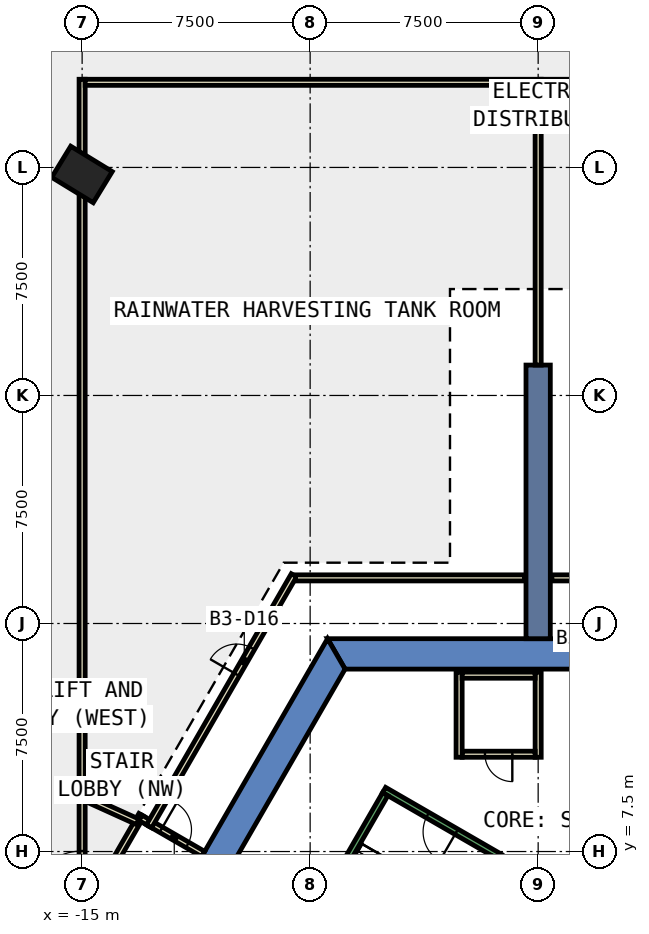
"""IFC4 building model, lengths in metres.
Left out: names, types, materials, properties, quantities, classifications, styles, units other than length and angle.
Written with IfcOpenShell. Run it as: python <this file> out.ifc"""

import sys

from ifc_helpers import new_model, si_unit, direction, frame, frame_2d, origin, origin_2d, place, context, subcontext, project, spatial, polyline, rectangle, outline, extrude, element, fill, save


model = new_model("IFC4")
c1 = context("Model", 3, precision=1e-05, world=origin(), true_north=direction((0.0, 1.0)))
c2 = subcontext(c1, "Body", "Model", "MODEL_VIEW")
j1 = project(units=[si_unit("LENGTHUNIT", "METRE"), si_unit("PLANEANGLEUNIT", "RADIAN")], contexts=[c1])
p1 = place(None, origin())
s1 = spatial("IfcSite", under=j1, at=p1, CompositionType="ELEMENT")
p2 = place(p1, origin())
s2 = spatial("IfcBuilding", under=s1, at=p2, CompositionType="ELEMENT")
p3 = place(p2, frame((0.0, 0.0, -16.5)))
s3 = spatial("IfcBuildingStorey", under=s2, at=p3, CompositionType="ELEMENT", Elevation=-16.5)
p4 = place(p3, frame((-15.005, 29.769, -0.4), z_axis=(0.0, 0.0, 1.0), x_axis=(0.521545830745, 0.853223268806, 0.0)))
e1 = element("IfcColumn", 1, at=p4, inside=s3, PredefinedType="COLUMN", context=c2, shape_type="SweptSolid", body=[
    extrude(rectangle(XDim=1.2, YDim=1.6, at=origin_2d()), origin(), (0.0, 0.0, 1.0), 5.48),
])
p5 = place(p3, origin())
e2 = element("IfcWall", 2, at=p5, inside=s3, PredefinedType="SHEAR", context=c2, shape_type="SweptSolid", body=[
    extrude(outline(polyline([(6.928, 14.5), (-6.928, 14.5), (-6.351, 13.5), (6.351, 13.5), (6.928, 14.5)])), origin(), (0.0, 0.0, 1.0), 5.08),
])
p6 = place(p3, origin())
e3 = element("IfcWall", 3, at=p6, inside=s3, PredefinedType="SHEAR", context=c2, shape_type="SweptSolid", body=[
    extrude(outline(polyline([(-12.267, 5.252), (-11.402, 4.752), (-6.351, 13.5), (-6.928, 14.5), (-12.267, 5.252)])), origin(), (0.0, 0.0, 1.0), 5.08),
])
p7 = place(p3, frame((0.0, 14.5, 0.0), z_axis=(0.0, 0.0, 1.0), x_axis=(0.0, 1.0, 0.0)))
e4 = element("IfcWall", 4, at=p7, inside=s3, PredefinedType="SHEAR", context=c2, shape_type="SweptSolid", body=[
    extrude(rectangle(XDim=9.0, YDim=0.8, at=frame_2d((4.5, 0.0))), origin(), (0.0, 0.0, 1.0), 5.08),
])
p8 = place(p3, frame((0.45, 16.5, 0.0), z_axis=(0.0, 0.0, 1.0), x_axis=(1.0, 0.0, 0.0)))
e5 = element("IfcWall", 5, at=p8, inside=s3, PredefinedType="PARTITIONING", context=c2, shape_type="SweptSolid", body=[
    extrude(rectangle(XDim=2.222, YDim=0.2, at=frame_2d((1.111, 0.0))), origin(), (0.0, 0.0, 1.0), 5.08),
])
p9 = place(p8, frame((0.792, 0.0, 0.0)))
e6 = element("IfcOpeningElement", 6, at=p9, cuts=e5, PredefinedType="OPENING", context=c2, shape_type="SweptSolid", body=[
    extrude(rectangle(XDim=1.0, YDim=2.1, at=frame_2d((0.5, 1.05))), frame((0.0, 0.11, 0.0), z_axis=(0.0, -1.0, 0.0), x_axis=(1.0, 0.0, 0.0)), (0.0, 0.0, 1.0), 0.22),
])
p10 = place(p3, frame((0.0, 23.5, 0.0), z_axis=(0.0, 0.0, 1.0), x_axis=(0.0, 1.0, 0.0)))
e7 = element("IfcWall", 7, at=p10, inside=s3, PredefinedType="PARTITIONING", context=c2, shape_type="SweptSolid", body=[
    extrude(rectangle(XDim=9.3, YDim=0.2, at=frame_2d((4.65, 0.0))), origin(), (0.0, 0.0, 1.0), 5.08),
])
p11 = place(p3, frame((0.1, 32.8, 0.0), z_axis=(0.0, 0.0, 1.0), x_axis=(1.0, 0.0, 0.0)))
e8 = element("IfcWall", 8, at=p11, inside=s3, PredefinedType="PARTITIONING", context=c2, shape_type="SweptSolid", body=[
    extrude(rectangle(XDim=5.8, YDim=0.2, at=frame_2d((2.9, 0.0))), origin(), (0.0, 0.0, 1.0), 5.08),
])
p12 = place(p3, frame((-12.749, 8.417, 0.0), z_axis=(0.0, 0.0, 1.0), x_axis=(0.866010750942, -0.50002537861, 0.0)))
e9 = element("IfcWall", 9, at=p12, inside=s3, PredefinedType="PARTITIONING", context=c2, shape_type="SweptSolid", body=[
    extrude(rectangle(XDim=2.0, YDim=0.2, at=frame_2d((1.0, 0.0))), origin(), (0.0, 0.0, 1.0), 5.08),
])
p13 = place(p12, frame((0.4, 0.0, 0.0)))
e10 = element("IfcOpeningElement", 10, at=p13, cuts=e9, PredefinedType="OPENING", context=c2, shape_type="SweptSolid", body=[
    extrude(rectangle(XDim=1.0, YDim=2.1, at=frame_2d((0.5, 1.05))), frame((0.0, 0.11, 0.0), z_axis=(0.0, -1.0, 0.0), x_axis=(1.0, 0.0, 0.0)), (0.0, 0.0, 1.0), 0.22),
])
p14 = place(p3, frame((-15.0, 5.318, 0.0), z_axis=(0.0, 0.0, 1.0), x_axis=(0.500034145141, 0.866005689181, 0.0)))
e11 = element("IfcWall", 11, at=p14, inside=s3, PredefinedType="PARTITIONING", context=c2, shape_type="SweptSolid", body=[
    extrude(rectangle(XDim=3.91, YDim=0.2, at=frame_2d((1.955, 0.0))), origin(), (0.0, 0.0, 1.0), 5.08),
])
p15 = place(p14, frame((0.418, 0.0, 0.0)))
e12 = element("IfcOpeningElement", 12, at=p15, cuts=e11, PredefinedType="OPENING", context=c2, shape_type="SweptSolid", body=[
    extrude(rectangle(XDim=1.0, YDim=2.1, at=frame_2d((0.5, 1.05))), frame((0.0, 0.11, 0.0), z_axis=(0.0, -1.0, 0.0), x_axis=(1.0, 0.0, 0.0)), (0.0, 0.0, 1.0), 0.22),
])
p16 = place(p3, frame((-13.082, 8.609, 0.0), z_axis=(0.0, 0.0, 1.0), x_axis=(0.865998573537, -0.500046468473, 0.0)))
e13 = element("IfcWall", 13, at=p16, inside=s3, PredefinedType="PARTITIONING", context=c2, shape_type="SweptSolid", body=[
    extrude(rectangle(XDim=0.37, YDim=0.2, at=frame_2d((0.185, 0.0))), origin(), (0.0, 0.0, 1.0), 5.08),
])
p17 = place(p3, frame((-12.799, 8.33, 0.0), z_axis=(0.0, 0.0, 1.0), x_axis=(0.499923440311, 0.86606960103, 0.0)))
e14 = element("IfcWall", 14, at=p17, inside=s3, PredefinedType="PARTITIONING", context=c2, shape_type="SweptSolid", body=[
    extrude(rectangle(XDim=9.534, YDim=0.2, at=frame_2d((4.767, 0.0))), origin(), (0.0, 0.0, 1.0), 5.08),
])
p18 = place(p17, frame((5.766, 0.0, 0.0)))
e15 = element("IfcOpeningElement", 15, at=p18, cuts=e14, PredefinedType="OPENING", context=c2, shape_type="SweptSolid", body=[
    extrude(rectangle(XDim=1.0, YDim=2.1, at=frame_2d((0.5, 1.05))), frame((0.0, 0.11, 0.0), z_axis=(0.0, -1.0, 0.0), x_axis=(1.0, 0.0, 0.0)), (0.0, 0.0, 1.0), 0.22),
])
p19 = place(p3, frame((-7.983, 16.5, 0.0), z_axis=(0.0, 0.0, 1.0), x_axis=(1.0, 0.0, 0.0)))
e16 = element("IfcWall", 16, at=p19, inside=s3, PredefinedType="PARTITIONING", context=c2, shape_type="SweptSolid", body=[
    extrude(rectangle(XDim=7.533, YDim=0.2, at=frame_2d((3.767, 0.0))), origin(), (0.0, 0.0, 1.0), 5.08),
])
p20 = place(p3, frame((-14.909, 9.264, 0.0), z_axis=(0.0, 0.0, 1.0), x_axis=(0.910722060418, -0.41301976789, 0.0)))
e17 = element("IfcWall", 17, at=p20, inside=s3, PredefinedType="PARTITIONING", context=c2, shape_type="SweptSolid", body=[
    extrude(rectangle(XDim=1.903, YDim=0.2, at=frame_2d((0.951, 0.0))), origin(), (0.0, 0.0, 1.0), 5.08),
])
p21 = place(p3, frame((-15.0, 5.318, 0.0), z_axis=(0.0, 0.0, 1.0), x_axis=(0.0, 1.0, 0.0)))
e18 = element("IfcWall", 18, at=p21, inside=s3, PredefinedType="PARTITIONING", context=c2, shape_type="SweptSolid", body=[
    extrude(rectangle(XDim=4.087, YDim=0.2, at=frame_2d((2.043, 0.0))), origin(), (0.0, 0.0, 1.0), 5.08),
])
p22 = place(p21, frame((0.4, 0.0, 0.0)))
e19 = element("IfcOpeningElement", 19, at=p22, cuts=e18, PredefinedType="OPENING", context=c2, shape_type="SweptSolid", body=[
    extrude(rectangle(XDim=1.8, YDim=2.1, at=frame_2d((0.9, 1.05))), frame((0.0, 0.11, 0.0), z_axis=(0.0, -1.0, 0.0), x_axis=(1.0, 0.0, 0.0)), (0.0, 0.0, 1.0), 0.22),
])
p23 = place(p3, frame((-15.0, 9.405, 0.0), z_axis=(0.0, 0.0, 1.0), x_axis=(0.0, 1.0, 0.0)))
e20 = element("IfcWall", 20, at=p23, inside=s3, PredefinedType="PARTITIONING", context=c2, shape_type="SweptSolid", body=[
    extrude(rectangle(XDim=23.495, YDim=0.2, at=frame_2d((11.748, 0.0))), origin(), (0.0, 0.0, 1.0), 5.08),
])
p24 = place(p3, frame((-14.9, 32.8, 0.0), z_axis=(0.0, 0.0, 1.0), x_axis=(1.0, 0.0, 0.0)))
e21 = element("IfcWall", 21, at=p24, inside=s3, PredefinedType="PARTITIONING", context=c2, shape_type="SweptSolid", body=[
    extrude(rectangle(XDim=15.0, YDim=0.2, at=frame_2d((7.5, 0.0))), origin(), (0.0, 0.0, 1.0), 5.08),
])
p25 = place(p3, frame((0.0, 13.4, 0.0), z_axis=(0.0, 0.0, 1.0), x_axis=(0.0, -1.0, 0.0)))
e22 = element("IfcWall", 22, at=p25, inside=s3, PredefinedType="PARTITIONING", context=c2, shape_type="SweptSolid", body=[
    extrude(rectangle(XDim=2.8, YDim=0.2, at=frame_2d((1.4, 0.0))), origin(), (0.0, 0.0, 1.0), 5.08),
])
p26 = place(p3, frame((-0.1, 10.7, 0.0), z_axis=(0.0, 0.0, 1.0), x_axis=(-1.0, 0.0, 0.0)))
e23 = element("IfcWall", 23, at=p26, inside=s3, PredefinedType="PARTITIONING", context=c2, shape_type="SweptSolid", body=[
    extrude(rectangle(XDim=2.4, YDim=0.2, at=frame_2d((1.2, 0.0))), origin(), (0.0, 0.0, 1.0), 5.08),
])
p27 = place(p26, frame((0.75, 0.0, 0.0)))
e24 = element("IfcOpeningElement", 24, at=p27, cuts=e23, PredefinedType="OPENING", context=c2, shape_type="SweptSolid", body=[
    extrude(rectangle(XDim=0.9, YDim=2.1, at=frame_2d((0.45, 1.05))), frame((0.0, 0.11, 0.0), z_axis=(0.0, -1.0, 0.0), x_axis=(1.0, 0.0, 0.0)), (0.0, 0.0, 1.0), 0.22),
])
p28 = place(p3, frame((-2.6, 10.6, 0.0), z_axis=(0.0, 0.0, 1.0), x_axis=(0.0, 1.0, 0.0)))
e25 = element("IfcWall", 25, at=p28, inside=s3, PredefinedType="PARTITIONING", context=c2, shape_type="SweptSolid", body=[
    extrude(rectangle(XDim=2.8, YDim=0.2, at=frame_2d((1.4, 0.0))), origin(), (0.0, 0.0, 1.0), 5.08),
])
p29 = place(p3, frame((-2.5, 13.3, 0.0), z_axis=(0.0, 0.0, 1.0), x_axis=(1.0, 0.0, 0.0)))
e26 = element("IfcWall", 26, at=p29, inside=s3, PredefinedType="PARTITIONING", context=c2, shape_type="SweptSolid", body=[
    extrude(rectangle(XDim=2.4, YDim=0.2, at=frame_2d((1.2, 0.0))), origin(), (0.0, 0.0, 1.0), 5.08),
])
p30 = place(p3, frame((-1.256, 7.324, 0.0), z_axis=(0.0, 0.0, 1.0), x_axis=(-0.866046073146, 0.499964197906, 0.0)))
e27 = element("IfcWall", 27, at=p30, inside=s3, PredefinedType="STANDARD", context=c2, shape_type="SweptSolid", body=[
    extrude(rectangle(XDim=4.4, YDim=0.2, at=frame_2d((2.2, 0.0))), origin(), (0.0, 0.0, 1.0), 5.08),
])
p31 = place(p30, frame((1.65, 0.0, 0.0)))
e28 = element("IfcOpeningElement", 28, at=p31, cuts=e27, PredefinedType="OPENING", context=c2, shape_type="SweptSolid", body=[
    extrude(rectangle(XDim=1.1, YDim=2.2, at=frame_2d((0.55, 1.1))), frame((0.0, 0.11, 0.0), z_axis=(0.0, -1.0, 0.0), x_axis=(1.0, 0.0, 0.0)), (0.0, 0.0, 1.0), 0.22),
])
p32 = place(p3, frame((-5.03, 9.388, 0.0), z_axis=(0.0, 0.0, 1.0), x_axis=(-0.499978703459, -0.866037698999, 0.0)))
e29 = element("IfcWall", 29, at=p32, inside=s3, PredefinedType="STANDARD", context=c2, shape_type="SweptSolid", body=[
    extrude(rectangle(XDim=6.9, YDim=0.2, at=frame_2d((3.45, 0.0))), origin(), (0.0, 0.0, 1.0), 5.08),
])
p33 = place(p13, origin())
e30 = element("IfcDoor", 30, at=p33, inside=s3, OperationType="SINGLE_SWING_LEFT", PredefinedType="DOOR", context=c2, shape_type="SweptSolid", body=[
    extrude(rectangle(XDim=1.0, YDim=2.1, at=frame_2d((0.5, 1.05))), frame((0.0, 0.025, 0.0), z_axis=(0.0, -1.0, 0.0), x_axis=(1.0, 0.0, 0.0)), (0.0, 0.0, 1.0), 0.05),
])
fill(e10, e30)
p34 = place(p18, origin())
e31 = element("IfcDoor", 31, at=p34, inside=s3, OperationType="SINGLE_SWING_RIGHT", PredefinedType="DOOR", context=c2, shape_type="SweptSolid", body=[
    extrude(rectangle(XDim=1.0, YDim=2.1, at=frame_2d((0.5, 1.05))), frame((0.0, 0.025, 0.0), z_axis=(0.0, -1.0, 0.0), x_axis=(1.0, 0.0, 0.0)), (0.0, 0.0, 1.0), 0.05),
])
fill(e15, e31)
p35 = place(p22, origin())
e32 = element("IfcDoor", 32, at=p35, inside=s3, OperationType="DOUBLE_DOOR_SINGLE_SWING", PredefinedType="DOOR", context=c2, shape_type="SweptSolid", body=[
    extrude(rectangle(XDim=1.8, YDim=2.1, at=frame_2d((0.9, 1.05))), frame((0.0, 0.025, 0.0), z_axis=(0.0, -1.0, 0.0), x_axis=(1.0, 0.0, 0.0)), (0.0, 0.0, 1.0), 0.05),
])
fill(e19, e32)
p36 = place(p27, origin())
e33 = element("IfcDoor", 33, at=p36, inside=s3, OperationType="SINGLE_SWING_RIGHT", PredefinedType="DOOR", context=c2, shape_type="SweptSolid", body=[
    extrude(rectangle(XDim=0.9, YDim=2.1, at=frame_2d((0.45, 1.05))), frame((0.0, 0.025, 0.0), z_axis=(0.0, -1.0, 0.0), x_axis=(1.0, 0.0, 0.0)), (0.0, 0.0, 1.0), 0.05),
])
fill(e24, e33)
p37 = place(p31, origin())
e34 = element("IfcDoor", 34, at=p37, inside=s3, OperationType="SINGLE_SWING_LEFT", PredefinedType="DOOR", context=c2, shape_type="SweptSolid", body=[
    extrude(rectangle(XDim=1.1, YDim=2.2, at=frame_2d((0.55, 1.1))), frame((0.0, 0.025, 0.0), z_axis=(0.0, -1.0, 0.0), x_axis=(1.0, 0.0, 0.0)), (0.0, 0.0, 1.0), 0.05),
])
fill(e28, e34)
save(model, sys.argv[1])
